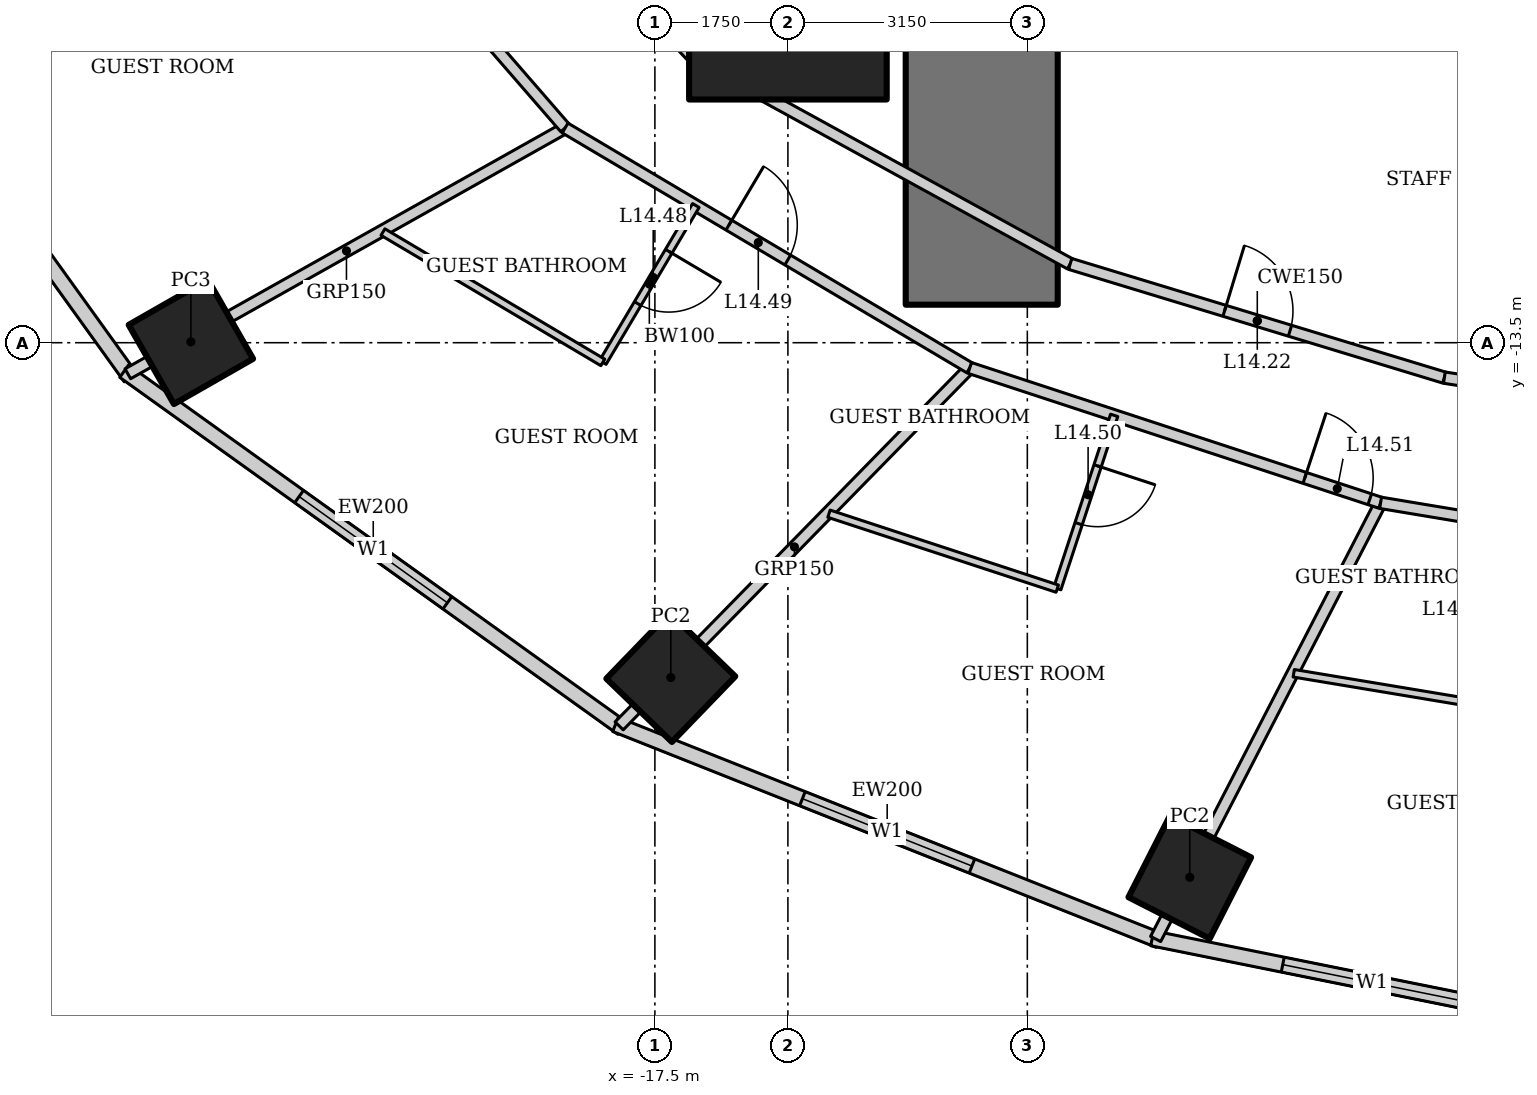
"""IFC4 building model, lengths in metres.
Left out: names, types, materials, properties, quantities, classifications, styles, units other than length and angle.
Written with IfcOpenShell. Run it as: python <this file> out.ifc"""

import sys

from ifc_helpers import new_model, si_unit, direction, frame, frame_2d, origin, origin_2d, place, context, subcontext, project, spatial, rectangle, hollow_rectangle, extrude, element, fill, save


model = new_model("IFC4")
c1 = context("Model", 3, precision=1e-05, world=origin(), true_north=direction((0.0, 1.0)))
c2 = subcontext(c1, "Body", "Model", "MODEL_VIEW")
j1 = project(units=[si_unit("LENGTHUNIT", "METRE"), si_unit("PLANEANGLEUNIT", "RADIAN")], contexts=[c1])
p1 = place(None, origin())
s1 = spatial("IfcSite", under=j1, at=p1, CompositionType="ELEMENT")
p2 = place(p1, origin())
s2 = spatial("IfcBuilding", under=s1, at=p2, CompositionType="ELEMENT")
p3 = place(p2, frame((0.0, 0.0, 65.8)))
s3 = spatial("IfcBuildingStorey", under=s2, at=p3, CompositionType="ELEMENT", Elevation=65.8)
p4 = place(p3, frame((-15.75, -9.0, 0.0), z_axis=(0.0, 0.0, 1.0), x_axis=(1.0, 0.0, 0.0)))
e1 = element("IfcColumn", 1, at=p4, inside=s3, PredefinedType="COLUMN", context=c2, shape_type="SweptSolid", body=[
    extrude(hollow_rectangle(XDim=2.6, YDim=2.6, WallThickness=0.13, at=origin_2d()), origin(), (0.0, 0.0, 1.0), 3.6),
])
p5 = place(p3, frame((-23.605, -13.489, 0.0), z_axis=(0.0, 0.0, 1.0), x_axis=(0.86824298017, 0.496139221777, 0.0)))
e2 = element("IfcColumn", 2, at=p5, inside=s3, PredefinedType="COLUMN", context=c2, shape_type="SweptSolid", body=[
    extrude(hollow_rectangle(XDim=1.2, YDim=1.2, WallThickness=0.12, at=origin_2d()), origin(), (0.0, 0.0, 1.0), 3.6),
])
for number, where, z_axis, x_axis in (
    (3, (-17.291, -17.905, 0.0), (0.0, 0.0, 1.0), (0.695, 0.719, 0.0)),
    (4, (-10.463, -20.534, 0.0), (0.0, 0.0, 1.0), (0.454, 0.891, 0.0)),
):
    element("IfcColumn", number, at=place(p3, frame(where, z_axis=z_axis, x_axis=x_axis)), inside=s3, PredefinedType="COLUMN", context=c2, shape_type="SweptSolid", body=[
        extrude(hollow_rectangle(XDim=1.2, YDim=1.2, WallThickness=0.1, at=origin_2d()), origin(), (0.0, 0.0, 1.0), 3.6),
    ])
p6 = place(p3, frame((-13.2, 13.0, 0.0), z_axis=(0.0, 0.0, 1.0), x_axis=(0.0, -1.0, 0.0)))
e5 = element("IfcWall", 5, at=p6, inside=s3, PredefinedType="SHEAR", context=c2, shape_type="SweptSolid", body=[
    extrude(rectangle(XDim=26.0, YDim=2.0, at=frame_2d((13.0, 0.0))), origin(), (0.0, 0.0, 1.0), 3.6),
])
p7 = place(p6, frame((12.1, 0.0, 0.0)))
e6 = element("IfcOpeningElement", 6, at=p7, cuts=e5, PredefinedType="OPENING", context=c2, shape_type="SweptSolid", body=[
    extrude(rectangle(XDim=1.8, YDim=2.1, at=frame_2d((0.9, 1.05))), frame((0.0, 1.01, 0.0), z_axis=(0.0, -1.0, 0.0), x_axis=(1.0, 0.0, 0.0)), (0.0, 0.0, 1.0), 2.02),
])
p8 = place(p3, frame((-29.26, -7.2, 0.0), z_axis=(0.0, 0.0, 1.0), x_axis=(0.583937613703, -0.811798536155, 0.0)))
e7 = element("IfcWall", 7, at=p8, inside=s3, PredefinedType="SOLIDWALL", context=c2, shape_type="SweptSolid", body=[
    extrude(rectangle(XDim=8.323, YDim=0.2, at=frame_2d((4.162, 0.0))), origin(), (0.0, 0.0, 1.0), 3.4),
])
p9 = place(p8, frame((2.961, 0.0, 0.5)))
e8 = element("IfcOpeningElement", 8, at=p9, cuts=e7, PredefinedType="OPENING", context=c2, shape_type="SweptSolid", body=[
    extrude(rectangle(XDim=2.4, YDim=2.2, at=frame_2d((1.2, 1.1))), frame((0.0, 0.11, 0.0), z_axis=(0.0, -1.0, 0.0), x_axis=(1.0, 0.0, 0.0)), (0.0, 0.0, 1.0), 0.22),
])
p10 = place(p3, frame((-24.482, -13.875, 0.0), z_axis=(0.0, 0.0, 1.0), x_axis=(0.812791321576, -0.582554948112, 0.0)))
e9 = element("IfcWall", 9, at=p10, inside=s3, PredefinedType="SOLIDWALL", context=c2, shape_type="SweptSolid", body=[
    extrude(rectangle(XDim=8.063, YDim=0.2, at=frame_2d((4.032, 0.0))), origin(), (0.0, 0.0, 1.0), 3.4),
])
p11 = place(p10, frame((2.832, 0.0, 0.5)))
e10 = element("IfcOpeningElement", 10, at=p11, cuts=e9, PredefinedType="OPENING", context=c2, shape_type="SweptSolid", body=[
    extrude(rectangle(XDim=2.4, YDim=2.2, at=frame_2d((1.2, 1.1))), frame((0.0, 0.11, 0.0), z_axis=(0.0, -1.0, 0.0), x_axis=(1.0, 0.0, 0.0)), (0.0, 0.0, 1.0), 0.22),
])
p12 = place(p3, frame((-18.018, -18.523, 0.0), z_axis=(0.0, 0.0, 1.0), x_axis=(0.929358351251, -0.369178892895, 0.0)))
e11 = element("IfcWall", 11, at=p12, inside=s3, PredefinedType="SOLIDWALL", context=c2, shape_type="SweptSolid", body=[
    extrude(rectangle(XDim=7.692, YDim=0.2, at=frame_2d((3.846, 0.0))), origin(), (0.0, 0.0, 1.0), 3.4),
])
p13 = place(p12, frame((2.646, 0.0, 0.5)))
e12 = element("IfcOpeningElement", 12, at=p13, cuts=e11, PredefinedType="OPENING", context=c2, shape_type="SweptSolid", body=[
    extrude(rectangle(XDim=2.4, YDim=2.2, at=frame_2d((1.2, 1.1))), frame((0.0, 0.11, 0.0), z_axis=(0.0, -1.0, 0.0), x_axis=(1.0, 0.0, 0.0)), (0.0, 0.0, 1.0), 0.22),
])
p14 = place(p3, frame((-10.957, -21.337, 0.0), z_axis=(0.0, 0.0, 1.0), x_axis=(0.980251657452, -0.197754110105, 0.0)))
e13 = element("IfcWall", 13, at=p14, inside=s3, PredefinedType="SOLIDWALL", context=c2, shape_type="SweptSolid", body=[
    extrude(rectangle(XDim=5.904, YDim=0.2, at=frame_2d((2.952, 0.0))), origin(), (0.0, 0.0, 1.0), 3.4),
])
p15 = place(p14, frame((1.752, 0.0, 0.5)))
e14 = element("IfcOpeningElement", 14, at=p15, cuts=e13, PredefinedType="OPENING", context=c2, shape_type="SweptSolid", body=[
    extrude(rectangle(XDim=2.4, YDim=2.2, at=frame_2d((1.2, 1.1))), frame((0.0, 0.11, 0.0), z_axis=(0.0, -1.0, 0.0), x_axis=(1.0, 0.0, 0.0)), (0.0, 0.0, 1.0), 0.22),
])
p16 = place(p3, frame((-24.435, -13.909, 0.0), z_axis=(0.0, 0.0, 1.0), x_axis=(0.871747379892, 0.489955616001, 0.0)))
e15 = element("IfcWall", 15, at=p16, inside=s3, PredefinedType="PARTITIONING", context=c2, shape_type="SweptSolid", body=[
    extrude(rectangle(XDim=6.6, YDim=0.15, at=frame_2d((3.3, 0.0))), origin(), (0.0, 0.0, 1.0), 2.693),
])
p17 = place(p3, frame((-17.97, -18.542, 0.0), z_axis=(0.0, 0.0, 1.0), x_axis=(0.699736251994, 0.714401272147, 0.0)))
e16 = element("IfcWall", 16, at=p17, inside=s3, PredefinedType="PARTITIONING", context=c2, shape_type="SweptSolid", body=[
    extrude(rectangle(XDim=6.593, YDim=0.15, at=frame_2d((3.296, 0.0))), origin(), (0.0, 0.0, 1.0), 2.528),
])
p18 = place(p3, frame((-10.912, -21.346, 0.0), z_axis=(0.0, 0.0, 1.0), x_axis=(0.458384799126, 0.888753833145, 0.0)))
e17 = element("IfcWall", 17, at=p18, inside=s3, PredefinedType="PARTITIONING", context=c2, shape_type="SweptSolid", body=[
    extrude(rectangle(XDim=6.457, YDim=0.15, at=frame_2d((3.229, 0.0))), origin(), (0.0, 0.0, 1.0), 2.528),
])
p19 = place(p3, frame((-22.976, -5.729, 0.0), z_axis=(0.0, 0.0, 1.0), x_axis=(0.655599989166, -0.755108372491, 0.0)))
e18 = element("IfcWall", 18, at=p19, inside=s3, PredefinedType="PARTITIONING", context=c2, shape_type="SweptSolid", body=[
    extrude(rectangle(XDim=6.551, YDim=0.15, at=frame_2d((3.275, 0.0))), origin(), (0.0, 0.0, 1.0), 3.45),
])
p20 = place(p19, frame((2.1, 0.0, 0.0)))
e19 = element("IfcOpeningElement", 19, at=p20, cuts=e18, PredefinedType="OPENING", context=c2, shape_type="SweptSolid", body=[
    extrude(rectangle(XDim=0.9, YDim=2.1, at=frame_2d((0.45, 1.05))), frame((0.0, 0.085, 0.0), z_axis=(0.0, -1.0, 0.0), x_axis=(1.0, 0.0, 0.0)), (0.0, 0.0, 1.0), 0.17),
])
p21 = place(p3, frame((-18.681, -10.675, 0.0), z_axis=(0.0, 0.0, 1.0), x_axis=(0.860147339762, -0.510045639036, 0.0)))
e20 = element("IfcWall", 20, at=p21, inside=s3, PredefinedType="PARTITIONING", context=c2, shape_type="SweptSolid", body=[
    extrude(rectangle(XDim=6.19, YDim=0.15, at=frame_2d((3.095, 0.0))), origin(), (0.0, 0.0, 1.0), 3.45),
])
p22 = place(p21, frame((2.505, 0.0, 0.0)))
e21 = element("IfcOpeningElement", 21, at=p22, cuts=e20, PredefinedType="OPENING", context=c2, shape_type="SweptSolid", body=[
    extrude(rectangle(XDim=0.9, YDim=2.1, at=frame_2d((0.45, 1.05))), frame((0.0, 0.085, 0.0), z_axis=(0.0, -1.0, 0.0), x_axis=(1.0, 0.0, 0.0)), (0.0, 0.0, 1.0), 0.17),
])
p23 = place(p3, frame((-13.357, -13.832, 0.0), z_axis=(0.0, 0.0, 1.0), x_axis=(0.950106803111, -0.311924770869, 0.0)))
e22 = element("IfcWall", 22, at=p23, inside=s3, PredefinedType="PARTITIONING", context=c2, shape_type="SweptSolid", body=[
    extrude(rectangle(XDim=5.689, YDim=0.15, at=frame_2d((2.845, 0.0))), origin(), (0.0, 0.0, 1.0), 3.45),
])
p24 = place(p23, frame((4.639, 0.0, 0.0)))
e23 = element("IfcOpeningElement", 23, at=p24, cuts=e22, PredefinedType="OPENING", context=c2, shape_type="SweptSolid", body=[
    extrude(rectangle(XDim=0.9, YDim=2.1, at=frame_2d((0.45, 1.05))), frame((0.0, 0.085, 0.0), z_axis=(0.0, -1.0, 0.0), x_axis=(1.0, 0.0, 0.0)), (0.0, 0.0, 1.0), 0.17),
])
p25 = place(p3, frame((-7.952, -15.607, 0.0), z_axis=(0.0, 0.0, 1.0), x_axis=(0.98641101506, -0.164296407044, 0.0)))
e24 = element("IfcWall", 24, at=p25, inside=s3, PredefinedType="PARTITIONING", context=c2, shape_type="SweptSolid", body=[
    extrude(rectangle(XDim=4.245, YDim=0.15, at=frame_2d((2.123, 0.0))), origin(), (0.0, 0.0, 1.0), 3.45),
])
p26 = place(p25, frame((2.1, 0.0, 0.0)))
e25 = element("IfcOpeningElement", 25, at=p26, cuts=e24, PredefinedType="OPENING", context=c2, shape_type="SweptSolid", body=[
    extrude(rectangle(XDim=0.9, YDim=2.1, at=frame_2d((0.45, 1.05))), frame((0.0, 0.085, 0.0), z_axis=(0.0, -1.0, 0.0), x_axis=(1.0, 0.0, 0.0)), (0.0, 0.0, 1.0), 0.17),
])
p27 = place(p3, frame((-21.184, -5.282, 0.0), z_axis=(0.0, 0.0, 1.0), x_axis=(0.68365836236, -0.729802194828, 0.0)))
e26 = element("IfcWall", 26, at=p27, inside=s3, PredefinedType="PARTITIONING", context=c2, shape_type="SweptSolid", body=[
    extrude(rectangle(XDim=6.09, YDim=0.15, at=frame_2d((3.045, 0.0))), origin(), (0.0, 0.0, 1.0), 3.45),
])
p28 = place(p27, frame((2.545, 0.0, 0.0)))
e27 = element("IfcOpeningElement", 27, at=p28, cuts=e26, PredefinedType="OPENING", context=c2, shape_type="SweptSolid", body=[
    extrude(rectangle(XDim=1.0, YDim=2.1, at=frame_2d((0.5, 1.05))), frame((0.0, 0.085, 0.0), z_axis=(0.0, -1.0, 0.0), x_axis=(1.0, 0.0, 0.0)), (0.0, 0.0, 1.0), 0.17),
])
p29 = place(p3, frame((-17.021, -9.726, 0.0), z_axis=(0.0, 0.0, 1.0), x_axis=(0.876522084062, -0.481361647986, 0.0)))
e28 = element("IfcWall", 28, at=p29, inside=s3, PredefinedType="PARTITIONING", context=c2, shape_type="SweptSolid", body=[
    extrude(rectangle(XDim=5.687, YDim=0.15, at=frame_2d((2.844, 0.0))), origin(), (0.0, 0.0, 1.0), 3.45),
])
p30 = place(p3, frame((-12.036, -12.464, 0.0), z_axis=(0.0, 0.0, 1.0), x_axis=(0.956795045135, -0.290763205385, 0.0)))
e29 = element("IfcWall", 29, at=p30, inside=s3, PredefinedType="PARTITIONING", context=c2, shape_type="SweptSolid", body=[
    extrude(rectangle(XDim=5.146, YDim=0.15, at=frame_2d((2.573, 0.0))), origin(), (0.0, 0.0, 1.0), 3.45),
])
p31 = place(p30, frame((2.123, 0.0, 0.0)))
e30 = element("IfcOpeningElement", 30, at=p31, cuts=e29, PredefinedType="OPENING", context=c2, shape_type="SweptSolid", body=[
    extrude(rectangle(XDim=0.9, YDim=2.1, at=frame_2d((0.45, 1.05))), frame((0.0, 0.085, 0.0), z_axis=(0.0, -1.0, 0.0), x_axis=(1.0, 0.0, 0.0)), (0.0, 0.0, 1.0), 0.17),
])
p32 = place(p3, frame((-7.113, -13.96, 0.0), z_axis=(0.0, 0.0, 1.0), x_axis=(0.988343461108, -0.152240608529, 0.0)))
e31 = element("IfcWall", 31, at=p32, inside=s3, PredefinedType="PARTITIONING", context=c2, shape_type="SweptSolid", body=[
    extrude(rectangle(XDim=3.801, YDim=0.15, at=frame_2d((1.9, 0.0))), origin(), (0.0, 0.0, 1.0), 3.45),
])
p33 = place(p3, frame((-16.961, -11.695, 0.0), z_axis=(0.0, 0.0, 1.0), x_axis=(-0.510075642074, -0.860129548012, 0.0)))
e32 = element("IfcWall", 32, at=p33, inside=s3, PredefinedType="PARTITIONING", context=c2, shape_type="SweptSolid", body=[
    extrude(rectangle(XDim=2.4, YDim=0.1, at=frame_2d((1.2, 0.0))), origin(), (0.0, 0.0, 1.0), 3.45),
])
p34 = place(p33, frame((0.7, 0.0, 0.0)))
e33 = element("IfcOpeningElement", 33, at=p34, cuts=e32, PredefinedType="OPENING", context=c2, shape_type="SweptSolid", body=[
    extrude(rectangle(XDim=0.8, YDim=2.1, at=frame_2d((0.4, 1.05))), frame((0.0, 0.06, 0.0), z_axis=(0.0, -1.0, 0.0), x_axis=(1.0, 0.0, 0.0)), (0.0, 0.0, 1.0), 0.12),
])
p35 = place(p3, frame((-18.185, -13.76, 0.0), z_axis=(0.0, 0.0, 1.0), x_axis=(-0.860146437071, 0.510047161343, 0.0)))
e34 = element("IfcWall", 34, at=p35, inside=s3, PredefinedType="PARTITIONING", context=c2, shape_type="SweptSolid", body=[
    extrude(rectangle(XDim=3.363, YDim=0.1, at=frame_2d((1.681, 0.0))), origin(), (0.0, 0.0, 1.0), 3.45),
])
p36 = place(p3, frame((-11.457, -14.456, 0.0), z_axis=(0.0, 0.0, 1.0), x_axis=(-0.311890952591, -0.950117905153, 0.0)))
e35 = element("IfcWall", 35, at=p36, inside=s3, PredefinedType="PARTITIONING", context=c2, shape_type="SweptSolid", body=[
    extrude(rectangle(XDim=2.4, YDim=0.1, at=frame_2d((1.2, 0.0))), origin(), (0.0, 0.0, 1.0), 3.45),
])
p37 = place(p36, frame((0.7, 0.0, 0.0)))
e36 = element("IfcOpeningElement", 36, at=p37, cuts=e35, PredefinedType="OPENING", context=c2, shape_type="SweptSolid", body=[
    extrude(rectangle(XDim=0.8, YDim=2.1, at=frame_2d((0.4, 1.05))), frame((0.0, 0.06, 0.0), z_axis=(0.0, -1.0, 0.0), x_axis=(1.0, 0.0, 0.0)), (0.0, 0.0, 1.0), 0.12),
])
p38 = place(p3, frame((-12.206, -16.736, 0.0), z_axis=(0.0, 0.0, 1.0), x_axis=(-0.950109912386, 0.311915300018, 0.0)))
e37 = element("IfcWall", 37, at=p38, inside=s3, PredefinedType="PARTITIONING", context=c2, shape_type="SweptSolid", body=[
    extrude(rectangle(XDim=3.161, YDim=0.1, at=frame_2d((1.581, 0.0))), origin(), (0.0, 0.0, 1.0), 3.45),
])
p39 = place(p3, frame((-6.374, -18.303, 0.0), z_axis=(0.0, 0.0, 1.0), x_axis=(-0.98640348956, 0.164341582641, 0.0)))
e38 = element("IfcWall", 38, at=p39, inside=s3, PredefinedType="PARTITIONING", context=c2, shape_type="SweptSolid", body=[
    extrude(rectangle(XDim=2.759, YDim=0.1, at=frame_2d((1.379, 0.0))), origin(), (0.0, 0.0, 1.0), 3.45),
])
p40 = place(p11, origin())
e39 = element("IfcWindow", 39, at=p40, inside=s3, PartitioningType="SINGLE_PANEL", PredefinedType="WINDOW", context=c2, shape_type="SweptSolid", body=[
    extrude(rectangle(XDim=2.4, YDim=2.2, at=frame_2d((1.2, 1.1))), frame((0.0, 0.03, 0.0), z_axis=(0.0, -1.0, 0.0), x_axis=(1.0, 0.0, 0.0)), (0.0, 0.0, 1.0), 0.06),
])
fill(e10, e39)
p41 = place(p13, origin())
e40 = element("IfcWindow", 40, at=p41, inside=s3, PartitioningType="SINGLE_PANEL", PredefinedType="WINDOW", context=c2, shape_type="SweptSolid", body=[
    extrude(rectangle(XDim=2.4, YDim=2.2, at=frame_2d((1.2, 1.1))), frame((0.0, 0.03, 0.0), z_axis=(0.0, -1.0, 0.0), x_axis=(1.0, 0.0, 0.0)), (0.0, 0.0, 1.0), 0.06),
])
fill(e12, e40)
p42 = place(p15, origin())
e41 = element("IfcWindow", 41, at=p42, inside=s3, PartitioningType="SINGLE_PANEL", PredefinedType="WINDOW", context=c2, shape_type="SweptSolid", body=[
    extrude(rectangle(XDim=2.4, YDim=2.2, at=frame_2d((1.2, 1.1))), frame((0.0, 0.03, 0.0), z_axis=(0.0, -1.0, 0.0), x_axis=(1.0, 0.0, 0.0)), (0.0, 0.0, 1.0), 0.06),
])
fill(e14, e41)
p43 = place(p31, origin())
e42 = element("IfcDoor", 42, at=p43, inside=s3, OperationType="SINGLE_SWING_LEFT", PredefinedType="DOOR", context=c2, shape_type="SweptSolid", body=[
    extrude(rectangle(XDim=0.9, YDim=2.1, at=frame_2d((0.45, 1.05))), frame((0.0, 0.025, 0.0), z_axis=(0.0, -1.0, 0.0), x_axis=(1.0, 0.0, 0.0)), (0.0, 0.0, 1.0), 0.05),
])
fill(e30, e42)
p44 = place(p34, origin())
e43 = element("IfcDoor", 43, at=p44, inside=s3, OperationType="SINGLE_SWING_LEFT", PredefinedType="DOOR", context=c2, shape_type="SweptSolid", body=[
    extrude(rectangle(XDim=0.8, YDim=2.1, at=frame_2d((0.4, 1.05))), frame((0.0, 0.025, 0.0), z_axis=(0.0, -1.0, 0.0), x_axis=(1.0, 0.0, 0.0)), (0.0, 0.0, 1.0), 0.05),
])
fill(e33, e43)
p45 = place(p22, origin())
e44 = element("IfcDoor", 44, at=p45, inside=s3, OperationType="SINGLE_SWING_LEFT", PredefinedType="DOOR", context=c2, shape_type="SweptSolid", body=[
    extrude(rectangle(XDim=0.9, YDim=2.1, at=frame_2d((0.45, 1.05))), frame((0.0, 0.025, 0.0), z_axis=(0.0, -1.0, 0.0), x_axis=(1.0, 0.0, 0.0)), (0.0, 0.0, 1.0), 0.05),
])
fill(e21, e44)
p46 = place(p37, origin())
e45 = element("IfcDoor", 45, at=p46, inside=s3, OperationType="SINGLE_SWING_LEFT", PredefinedType="DOOR", context=c2, shape_type="SweptSolid", body=[
    extrude(rectangle(XDim=0.8, YDim=2.1, at=frame_2d((0.4, 1.05))), frame((0.0, 0.025, 0.0), z_axis=(0.0, -1.0, 0.0), x_axis=(1.0, 0.0, 0.0)), (0.0, 0.0, 1.0), 0.05),
])
fill(e36, e45)
p47 = place(p24, origin())
e46 = element("IfcDoor", 46, at=p47, inside=s3, OperationType="SINGLE_SWING_LEFT", PredefinedType="DOOR", context=c2, shape_type="SweptSolid", body=[
    extrude(rectangle(XDim=0.9, YDim=2.1, at=frame_2d((0.45, 1.05))), frame((0.0, 0.025, 0.0), z_axis=(0.0, -1.0, 0.0), x_axis=(1.0, 0.0, 0.0)), (0.0, 0.0, 1.0), 0.05),
])
fill(e23, e46)
save(model, sys.argv[1])
